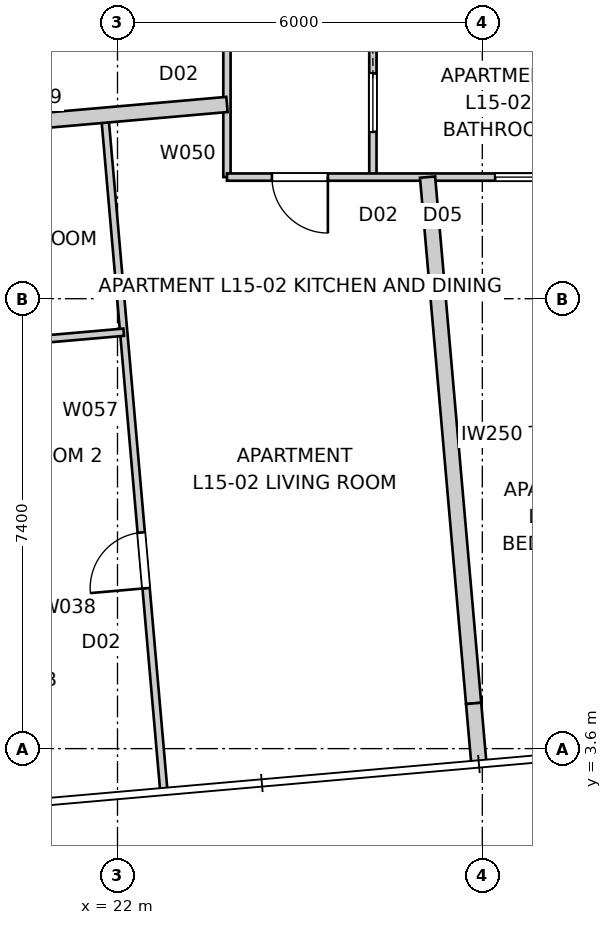
"""IFC4 building model, lengths in metres.
Left out: names, types, materials, properties, quantities, classifications, styles, units other than length and angle.
Written with IfcOpenShell. Run it as: python <this file> out.ifc"""

import sys

from ifc_helpers import new_model, si_unit, direction, frame, frame_2d, origin, place, context, subcontext, project, spatial, rectangle, extrude, element, fill, save


model = new_model("IFC4")
c1 = context("Model", 3, precision=1e-05, world=origin(), true_north=direction((0.0, 1.0)))
c2 = subcontext(c1, "Body", "Model", "MODEL_VIEW")
j1 = project(units=[si_unit("LENGTHUNIT", "METRE"), si_unit("PLANEANGLEUNIT", "RADIAN")], contexts=[c1])
p1 = place(None, origin())
s1 = spatial("IfcSite", under=j1, at=p1, CompositionType="ELEMENT")
p2 = place(p1, origin())
s2 = spatial("IfcBuilding", under=s1, at=p2, CompositionType="ELEMENT")
p3 = place(p2, frame((0.0, 0.0, 57.4)))
s3 = spatial("IfcBuildingStorey", under=s2, at=p3, CompositionType="ELEMENT", Elevation=57.4)
p4 = place(p3, frame((23.8, 13.0, 0.0), z_axis=(0.0, 0.0, 1.0), x_axis=(0.0, 1.0, 0.0)))
e1 = element("IfcWall", 1, at=p4, inside=s3, PredefinedType="PARTITIONING", context=c2, shape_type="SweptSolid", body=[
    extrude(rectangle(XDim=8.439, YDim=0.12, at=frame_2d((4.219, 0.0))), origin(), (0.0, 0.0, 1.0), 2.549),
])
p5 = place(p4, frame((2.508, 0.0, 0.0)))
e2 = element("IfcOpeningElement", 2, at=p5, cuts=e1, PredefinedType="OPENING", context=c2, shape_type="SweptSolid", body=[
    extrude(rectangle(XDim=0.92, YDim=2.34, at=frame_2d((0.46, 1.17))), frame((0.0, 0.07, 0.0), z_axis=(0.0, -1.0, 0.0), x_axis=(1.0, 0.0, 0.0)), (0.0, 0.0, 1.0), 0.14),
])
p6 = place(p4, frame((5.685, 0.0, 0.0)))
e3 = element("IfcOpeningElement", 3, at=p6, cuts=e1, PredefinedType="OPENING", context=c2, shape_type="SweptSolid", body=[
    extrude(rectangle(XDim=0.96, YDim=2.1, at=frame_2d((0.48, 1.05))), frame((0.0, 0.07, 0.0), z_axis=(0.0, -1.0, 0.0), x_axis=(1.0, 0.0, 0.0)), (0.0, 0.0, 1.0), 0.14),
])
p7 = place(p3, frame((26.2, 15.45, 0.0), z_axis=(0.0, 0.0, 1.0), x_axis=(0.0, -1.0, 0.0)))
e4 = element("IfcWall", 4, at=p7, inside=s3, PredefinedType="PARTITIONING", context=c2, shape_type="SweptSolid", body=[
    extrude(rectangle(XDim=2.45, YDim=0.12, at=frame_2d((1.225, 0.0))), origin(), (0.0, 0.0, 1.0), 3.25),
])
p8 = place(p7, frame((0.745, 0.0, 0.0)))
e5 = element("IfcOpeningElement", 5, at=p8, cuts=e4, PredefinedType="OPENING", context=c2, shape_type="SweptSolid", body=[
    extrude(rectangle(XDim=0.96, YDim=2.1, at=frame_2d((0.48, 1.05))), frame((0.0, 0.07, 0.0), z_axis=(0.0, -1.0, 0.0), x_axis=(1.0, 0.0, 0.0)), (0.0, 0.0, 1.0), 0.14),
])
p9 = place(p3, frame((30.333, 13.0, 0.0), z_axis=(0.0, 0.0, 1.0), x_axis=(-1.0, 0.0, 0.0)))
e6 = element("IfcWall", 6, at=p9, inside=s3, PredefinedType="PARTITIONING", context=c2, shape_type="SweptSolid", body=[
    extrude(rectangle(XDim=6.533, YDim=0.12, at=frame_2d((3.267, 0.0))), origin(), (0.0, 0.0, 1.0), 3.25),
])
p10 = place(p9, frame((4.873, 0.0, 0.0)))
e7 = element("IfcOpeningElement", 7, at=p10, cuts=e6, PredefinedType="OPENING", context=c2, shape_type="SweptSolid", body=[
    extrude(rectangle(XDim=0.92, YDim=2.34, at=frame_2d((0.46, 1.17))), frame((0.0, 0.07, 0.0), z_axis=(0.0, -1.0, 0.0), x_axis=(1.0, 0.0, 0.0)), (0.0, 0.0, 1.0), 0.14),
])
p11 = place(p9, frame((1.162, 0.0, 0.0)))
e8 = element("IfcOpeningElement", 8, at=p11, cuts=e6, PredefinedType="OPENING", context=c2, shape_type="SweptSolid", body=[
    extrude(rectangle(XDim=0.96, YDim=2.1, at=frame_2d((0.48, 1.05))), frame((0.0, 0.07, 0.0), z_axis=(0.0, -1.0, 0.0), x_axis=(1.0, 0.0, 0.0)), (0.0, 0.0, 1.0), 0.14),
])
p12 = place(p3, frame((22.759, 2.934, 0.0), z_axis=(0.0, 0.0, 1.0), x_axis=(-0.087130477128, 0.996196908224, 0.0)))
e9 = element("IfcWall", 9, at=p12, inside=s3, PredefinedType="PARTITIONING", context=c2, shape_type="SweptSolid", body=[
    extrude(rectangle(XDim=11.127, YDim=0.12, at=frame_2d((5.563, 0.0))), origin(), (0.0, 0.0, 1.0), 3.25),
])
p13 = place(p12, frame((3.317, 0.0, 0.0)))
e10 = element("IfcOpeningElement", 10, at=p13, cuts=e9, PredefinedType="OPENING", context=c2, shape_type="SweptSolid", body=[
    extrude(rectangle(XDim=0.92, YDim=2.34, at=frame_2d((0.46, 1.17))), frame((0.0, 0.07, 0.0), z_axis=(0.0, -1.0, 0.0), x_axis=(1.0, 0.0, 0.0)), (0.0, 0.0, 1.0), 0.14),
])
p14 = place(p3, frame((16.843, 13.586, 0.0), z_axis=(0.0, 0.0, 1.0), x_axis=(0.996195462691, 0.087147002895, 0.0)))
e11 = element("IfcWall", 11, at=p14, inside=s3, PredefinedType="PARTITIONING", context=c2, shape_type="SweptSolid", body=[
    extrude(rectangle(XDim=6.984, YDim=0.25, at=frame_2d((3.492, 0.0))), origin(), (0.0, 0.0, 1.0), 2.638),
])
p15 = place(p14, frame((1.548, 0.0, 0.0)))
e12 = element("IfcOpeningElement", 12, at=p15, cuts=e11, PredefinedType="OPENING", context=c2, shape_type="SweptSolid", body=[
    extrude(rectangle(XDim=0.92, YDim=2.34, at=frame_2d((0.46, 1.17))), frame((0.0, 0.135, 0.0), z_axis=(0.0, -1.0, 0.0), x_axis=(1.0, 0.0, 0.0)), (0.0, 0.0, 1.0), 0.27),
])
p16 = place(p3, frame((27.099, 13.0, 0.0), z_axis=(0.0, 0.0, 1.0), x_axis=(0.087158236544, -0.99619447991, 0.0)))
e13 = element("IfcWall", 13, at=p16, inside=s3, PredefinedType="PARTITIONING", context=c2, shape_type="SweptSolid", body=[
    extrude(rectangle(XDim=8.689, YDim=0.25, at=frame_2d((4.344, 0.0))), origin(), (0.0, 0.0, 1.0), 2.638),
])
p17 = place(p3, frame((27.856, 4.344, 0.0), z_axis=(0.0, 0.0, 1.0), x_axis=(0.087233202944, -0.996187918168, 0.0)))
e14 = element("IfcWall", 14, at=p17, inside=s3, PredefinedType="PARTITIONING", context=c2, shape_type="SweptSolid", body=[
    extrude(rectangle(XDim=0.96, YDim=0.25, at=frame_2d((0.48, 0.0))), origin(), (0.0, 0.0, 1.0), 3.25),
])
p18 = place(p3, frame((16.198, 9.933, 0.0), z_axis=(0.0, 0.0, 1.0), x_axis=(0.996196712973, 0.08713270948, 0.0)))
e15 = element("IfcWall", 15, at=p18, inside=s3, PredefinedType="PARTITIONING", context=c2, shape_type="SweptSolid", body=[
    extrude(rectangle(XDim=5.926, YDim=0.12, at=frame_2d((2.963, 0.0))), origin(), (0.0, 0.0, 1.0), 3.25),
])
p19 = place(p8, origin())
e16 = element("IfcDoor", 16, at=p19, inside=s3, OperationType="SLIDING_TO_LEFT", PredefinedType="DOOR", context=c2, shape_type="SweptSolid", body=[
    extrude(rectangle(XDim=0.96, YDim=2.1, at=frame_2d((0.48, 1.05))), frame((0.0, 0.025, 0.0), z_axis=(0.0, -1.0, 0.0), x_axis=(1.0, 0.0, 0.0)), (0.0, 0.0, 1.0), 0.05),
])
fill(e5, e16)
p20 = place(p10, origin())
e17 = element("IfcDoor", 17, at=p20, inside=s3, OperationType="SINGLE_SWING_LEFT", PredefinedType="DOOR", context=c2, shape_type="SweptSolid", body=[
    extrude(rectangle(XDim=0.92, YDim=2.34, at=frame_2d((0.46, 1.17))), frame((0.0, 0.025, 0.0), z_axis=(0.0, -1.0, 0.0), x_axis=(1.0, 0.0, 0.0)), (0.0, 0.0, 1.0), 0.05),
])
fill(e7, e17)
p21 = place(p11, origin())
e18 = element("IfcDoor", 18, at=p21, inside=s3, OperationType="SLIDING_TO_LEFT", PredefinedType="DOOR", context=c2, shape_type="SweptSolid", body=[
    extrude(rectangle(XDim=0.96, YDim=2.1, at=frame_2d((0.48, 1.05))), frame((0.0, 0.025, 0.0), z_axis=(0.0, -1.0, 0.0), x_axis=(1.0, 0.0, 0.0)), (0.0, 0.0, 1.0), 0.05),
])
fill(e8, e18)
p22 = place(p13, origin())
e19 = element("IfcDoor", 19, at=p22, inside=s3, OperationType="SINGLE_SWING_LEFT", PredefinedType="DOOR", context=c2, shape_type="SweptSolid", body=[
    extrude(rectangle(XDim=0.92, YDim=2.34, at=frame_2d((0.46, 1.17))), frame((0.0, 0.025, 0.0), z_axis=(0.0, -1.0, 0.0), x_axis=(1.0, 0.0, 0.0)), (0.0, 0.0, 1.0), 0.05),
])
fill(e10, e19)
save(model, sys.argv[1])
